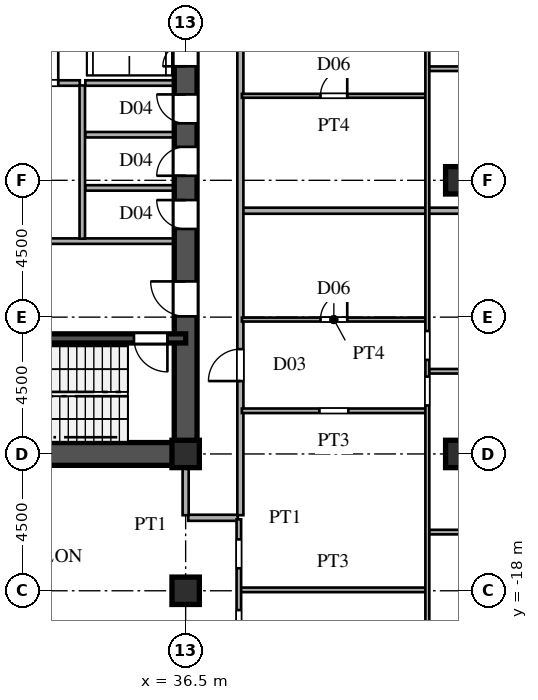
"""IFC4 building model, lengths in metres.
Left out: names, types, materials, properties, quantities, classifications, styles, units other than length and angle.
Written with IfcOpenShell. Run it as: python <this file> out.ifc"""

import sys

from ifc_helpers import new_model, si_unit, direction, frame, frame_2d, origin, origin_2d, place, context, subcontext, project, spatial, rectangle, i_section, extrude, source, transform, mapped, element, fill, save


model = new_model("IFC4")
c1 = context("Model", 3, precision=1e-05, world=origin(), true_north=direction((0.0, 1.0)))
c2 = subcontext(c1, "Body", "Model", "MODEL_VIEW")
j1 = project(units=[si_unit("LENGTHUNIT", "METRE"), si_unit("PLANEANGLEUNIT", "RADIAN")], contexts=[c1])
p1 = place(None, origin())
s1 = spatial("IfcSite", under=j1, at=p1, CompositionType="ELEMENT")
p2 = place(p1, origin())
s2 = spatial("IfcBuilding", under=s1, at=p2, CompositionType="ELEMENT")
p3 = place(p2, frame((0.0, 0.0, 54.9)))
s3 = spatial("IfcBuildingStorey", under=s2, at=p3, CompositionType="ELEMENT", Elevation=54.9)
m1 = source(origin(), c2, "Body", "SweptSolid", [
    extrude(i_section(OverallWidth=0.9, OverallDepth=0.9, WebThickness=0.036, FlangeThickness=0.055, at=origin_2d()), origin(), (0.0, 0.0, 1.0), 3.6),
])
for number, where, z_axis, x_axis in (
    (1, (36.5, -18.0, 0.0), (0.0, 0.0, 1.0), (1.0, 0.0, 0.0)),
    (2, (36.5, -13.5, 0.0), (0.0, 0.0, 1.0), (1.0, 0.0, 0.0)),
    (3, (45.5, -13.5, 0.0), (0.0, 0.0, 1.0), (1.0, 0.0, 0.0)),
    (4, (45.5, -4.5, 0.0), (0.0, 0.0, 1.0), (1.0, 0.0, 0.0)),
):
    element("IfcColumn", number, at=place(p3, frame(where, z_axis=z_axis, x_axis=x_axis)), inside=s3, PredefinedType="COLUMN", context=c2, shape_type="MappedRepresentation", body=[
        mapped(m1, transform((0.0, 0.0, 0.0), scale=1.0)),
    ])
p4 = place(p3, frame((27.5, -13.5, 0.0), z_axis=(0.0, 0.0, 1.0), x_axis=(1.0, 0.0, 0.0)))
e5 = element("IfcWall", 5, at=p4, inside=s3, PredefinedType="SHEAR", context=c2, shape_type="SweptSolid", body=[
    extrude(rectangle(XDim=9.0, YDim=0.75, at=frame_2d((4.5, 0.0))), origin(), (0.0, 0.0, 1.0), 3.38),
])
p5 = place(p3, frame((36.5, -13.65, 0.0), z_axis=(0.0, 0.0, 1.0), x_axis=(0.0, 1.0, 0.0)))
e6 = element("IfcWall", 6, at=p5, inside=s3, PredefinedType="SHEAR", context=c2, shape_type="SweptSolid", body=[
    extrude(rectangle(XDim=7.15, YDim=0.75, at=frame_2d((3.575, 0.0))), origin(), (0.0, 0.0, 1.0), 3.38),
])
p6 = place(p5, frame((4.675, 0.0, 0.0)))
e7 = element("IfcOpeningElement", 7, at=p6, cuts=e6, PredefinedType="OPENING", context=c2, shape_type="SweptSolid", body=[
    extrude(rectangle(XDim=1.15, YDim=2.2, at=frame_2d((0.575, 1.1))), frame((0.0, 0.385, 0.0), z_axis=(0.0, -1.0, 0.0), x_axis=(1.0, 0.0, 0.0)), (0.0, 0.0, 1.0), 0.77),
])
p7 = place(p3, frame((36.5, -1.3, 0.0), z_axis=(0.0, 0.0, 1.0), x_axis=(0.0, 1.0, 0.0)))
e8 = element("IfcWall", 8, at=p7, inside=s3, PredefinedType="SHEAR", context=c2, shape_type="SweptSolid", body=[
    extrude(rectangle(XDim=2.6, YDim=0.75, at=frame_2d((1.3, 0.0))), origin(), (0.0, 0.0, 1.0), 3.38),
])
p8 = place(p7, frame((0.55, 0.0, 0.0)))
e9 = element("IfcOpeningElement", 9, at=p8, cuts=e8, PredefinedType="OPENING", context=c2, shape_type="SweptSolid", body=[
    extrude(rectangle(XDim=1.5, YDim=2.3, at=frame_2d((0.75, 1.15))), frame((0.0, 0.385, 0.0), z_axis=(0.0, -1.0, 0.0), x_axis=(1.0, 0.0, 0.0)), (0.0, 0.0, 1.0), 0.77),
])
p9 = place(p3, frame((36.5, -6.5, 0.0), z_axis=(0.0, 0.0, 1.0), x_axis=(0.0, 1.0, 0.0)))
e10 = element("IfcWall", 10, at=p9, inside=s3, PredefinedType="SHEAR", context=c2, shape_type="SweptSolid", body=[
    extrude(rectangle(XDim=1.75, YDim=0.75, at=frame_2d((0.875, 0.0))), origin(), (0.0, 0.0, 1.0), 3.38),
])
p10 = place(p9, frame((0.4, 0.0, 0.0)))
e11 = element("IfcOpeningElement", 11, at=p10, cuts=e10, PredefinedType="OPENING", context=c2, shape_type="SweptSolid", body=[
    extrude(rectangle(XDim=0.95, YDim=2.15, at=frame_2d((0.475, 1.075))), frame((0.0, 0.385, 0.0), z_axis=(0.0, -1.0, 0.0), x_axis=(1.0, 0.0, 0.0)), (0.0, 0.0, 1.0), 0.77),
])
p11 = place(p3, frame((36.5, -4.75, 0.0), z_axis=(0.0, 0.0, 1.0), x_axis=(0.0, 1.0, 0.0)))
e12 = element("IfcWall", 12, at=p11, inside=s3, PredefinedType="SHEAR", context=c2, shape_type="SweptSolid", body=[
    extrude(rectangle(XDim=1.75, YDim=0.75, at=frame_2d((0.875, 0.0))), origin(), (0.0, 0.0, 1.0), 3.38),
])
p12 = place(p11, frame((0.4, 0.0, 0.0)))
e13 = element("IfcOpeningElement", 13, at=p12, cuts=e12, PredefinedType="OPENING", context=c2, shape_type="SweptSolid", body=[
    extrude(rectangle(XDim=0.95, YDim=2.15, at=frame_2d((0.475, 1.075))), frame((0.0, 0.385, 0.0), z_axis=(0.0, -1.0, 0.0), x_axis=(1.0, 0.0, 0.0)), (0.0, 0.0, 1.0), 0.77),
])
p13 = place(p3, frame((36.5, -3.0, 0.0), z_axis=(0.0, 0.0, 1.0), x_axis=(0.0, 1.0, 0.0)))
e14 = element("IfcWall", 14, at=p13, inside=s3, PredefinedType="SHEAR", context=c2, shape_type="SweptSolid", body=[
    extrude(rectangle(XDim=1.7, YDim=0.75, at=frame_2d((0.85, 0.0))), origin(), (0.0, 0.0, 1.0), 3.38),
])
p14 = place(p13, frame((0.375, 0.0, 0.0)))
e15 = element("IfcOpeningElement", 15, at=p14, cuts=e14, PredefinedType="OPENING", context=c2, shape_type="SweptSolid", body=[
    extrude(rectangle(XDim=0.95, YDim=2.15, at=frame_2d((0.475, 1.075))), frame((0.0, 0.385, 0.0), z_axis=(0.0, -1.0, 0.0), x_axis=(1.0, 0.0, 0.0)), (0.0, 0.0, 1.0), 0.77),
])
p15 = place(p3, frame((27.5, -9.7, 0.0), z_axis=(0.0, 0.0, 1.0), x_axis=(1.0, 0.0, 0.0)))
e16 = element("IfcWall", 16, at=p15, inside=s3, PredefinedType="SHEAR", context=c2, shape_type="SweptSolid", body=[
    extrude(rectangle(XDim=9.0, YDim=0.3, at=frame_2d((4.5, 0.0))), origin(), (0.0, 0.0, 1.0), 3.38),
])
p16 = place(p15, frame((7.3, 0.0, 0.0)))
e17 = element("IfcOpeningElement", 17, at=p16, cuts=e16, PredefinedType="OPENING", context=c2, shape_type="SweptSolid", body=[
    extrude(rectangle(XDim=1.1, YDim=2.2, at=frame_2d((0.55, 1.1))), frame((0.0, 0.16, 0.0), z_axis=(0.0, -1.0, 0.0), x_axis=(1.0, 0.0, 0.0)), (0.0, 0.0, 1.0), 0.32),
])
p17 = place(p3, frame((30.45, -6.5, 0.0), z_axis=(0.0, 0.0, 1.0), x_axis=(1.0, 0.0, 0.0)))
e18 = element("IfcWall", 18, at=p17, inside=s3, PredefinedType="PARTITIONING", context=c2, shape_type="SweptSolid", body=[
    extrude(rectangle(XDim=5.7, YDim=0.18, at=frame_2d((2.85, 0.0))), origin(), (0.0, 0.0, 1.0), 3.38),
])
p18 = place(p3, frame((33.1, -6.42, 0.0), z_axis=(0.0, 0.0, 1.0), x_axis=(0.0, 1.0, 0.0)))
e19 = element("IfcWall", 19, at=p18, inside=s3, PredefinedType="PARTITIONING", context=c2, shape_type="SweptSolid", body=[
    extrude(rectangle(XDim=5.04, YDim=0.18, at=frame_2d((2.52, 0.0))), origin(), (0.0, 0.0, 1.0), 3.38),
])
p19 = place(p3, frame((30.45, -1.3, 0.0), z_axis=(0.0, 0.0, 1.0), x_axis=(1.0, 0.0, 0.0)))
e20 = element("IfcWall", 20, at=p19, inside=s3, PredefinedType="PARTITIONING", context=c2, shape_type="SweptSolid", body=[
    extrude(rectangle(XDim=2.57, YDim=0.18, at=frame_2d((1.285, 0.0))), origin(), (0.0, 0.0, 1.0), 3.38),
])
p20 = place(p19, frame((0.71, 0.0, 0.0)))
e21 = element("IfcOpeningElement", 21, at=p20, cuts=e20, PredefinedType="OPENING", context=c2, shape_type="SweptSolid", body=[
    extrude(rectangle(XDim=1.15, YDim=2.2, at=frame_2d((0.575, 1.1))), frame((0.0, 0.1, 0.0), z_axis=(0.0, -1.0, 0.0), x_axis=(1.0, 0.0, 0.0)), (0.0, 0.0, 1.0), 0.2),
])
for number, where, z_axis, x_axis in (
    (22, (33.2, -1.3, 0.0), (0.0, 0.0, 1.0), (1.0, 0.0, 0.0)),
    (23, (33.2, -4.75, 0.0), (0.0, 0.0, 1.0), (1.0, 0.0, 0.0)),
    (24, (33.2, -3.0, 0.0), (0.0, 0.0, 1.0), (1.0, 0.0, 0.0)),
):
    element("IfcWall", number, at=place(p3, frame(where, z_axis=z_axis, x_axis=x_axis)), inside=s3, PredefinedType="PARTITIONING", context=c2, shape_type="SweptSolid", body=[
        extrude(rectangle(XDim=2.95, YDim=0.18, at=frame_2d((1.475, 0.0))), origin(), (0.0, 0.0, 1.0), 3.38),
    ])
p21 = place(p3, frame((38.3, -17.97, 0.0), z_axis=(0.0, 0.0, 1.0), x_axis=(1.0, 0.0, 0.0)))
e25 = element("IfcWall", 25, at=p21, inside=s3, PredefinedType="PARTITIONING", context=c2, shape_type="SweptSolid", body=[
    extrude(rectangle(XDim=6.1, YDim=0.15, at=frame_2d((3.05, 0.0))), origin(), (0.0, 0.0, 1.0), 3.38),
])
p22 = place(p3, frame((44.5, -16.07, 0.0), z_axis=(0.0, 0.0, 1.0), x_axis=(1.0, 0.0, 0.0)))
e26 = element("IfcWall", 26, at=p22, inside=s3, PredefinedType="PARTITIONING", context=c2, shape_type="SweptSolid", body=[
    extrude(rectangle(XDim=9.95, YDim=0.15, at=frame_2d((4.975, 0.0))), origin(), (0.0, 0.0, 1.0), 3.38),
])
p23 = place(p22, frame((4.5, 0.0, 0.0)))
e27 = element("IfcOpeningElement", 27, at=p23, cuts=e26, PredefinedType="OPENING", context=c2, shape_type="SweptSolid", body=[
    extrude(rectangle(XDim=0.95, YDim=2.15, at=frame_2d((0.475, 1.075))), frame((0.0, 0.085, 0.0), z_axis=(0.0, -1.0, 0.0), x_axis=(1.0, 0.0, 0.0)), (0.0, 0.0, 1.0), 0.17),
])
p24 = place(p3, frame((36.585, -15.6, 0.0), z_axis=(0.0, 0.0, 1.0), x_axis=(1.0, 0.0, 0.0)))
e28 = element("IfcWall", 28, at=p24, inside=s3, PredefinedType="PARTITIONING", context=c2, shape_type="SweptSolid", body=[
    extrude(rectangle(XDim=1.63, YDim=0.2, at=frame_2d((0.815, 0.0))), origin(), (0.0, 0.0, 1.0), 3.38),
])
p25 = place(p3, frame((38.35, -12.08, 0.0), z_axis=(0.0, 0.0, 1.0), x_axis=(1.0, 0.0, 0.0)))
e29 = element("IfcWall", 29, at=p25, inside=s3, PredefinedType="PARTITIONING", context=c2, shape_type="SweptSolid", body=[
    extrude(rectangle(XDim=6.05, YDim=0.15, at=frame_2d((3.025, 0.0))), origin(), (0.0, 0.0, 1.0), 3.38),
])
p26 = place(p25, frame((2.55, 0.0, 0.0)))
e30 = element("IfcOpeningElement", 30, at=p26, cuts=e29, PredefinedType="OPENING", context=c2, shape_type="SweptSolid", body=[
    extrude(rectangle(XDim=0.95, YDim=2.15, at=frame_2d((0.475, 1.075))), frame((0.0, 0.085, 0.0), z_axis=(0.0, -1.0, 0.0), x_axis=(1.0, 0.0, 0.0)), (0.0, 0.0, 1.0), 0.17),
])
p27 = place(p3, frame((44.5, -10.78, 0.0), z_axis=(0.0, 0.0, 1.0), x_axis=(1.0, 0.0, 0.0)))
e31 = element("IfcWall", 31, at=p27, inside=s3, PredefinedType="PARTITIONING", context=c2, shape_type="SweptSolid", body=[
    extrude(rectangle(XDim=26.097, YDim=0.15, at=frame_2d((13.048, 0.0))), origin(), (0.0, 0.0, 1.0), 3.38),
])
p28 = place(p27, frame((12.375, 0.0, 0.0)))
e32 = element("IfcOpeningElement", 32, at=p28, cuts=e31, PredefinedType="OPENING", context=c2, shape_type="SweptSolid", body=[
    extrude(rectangle(XDim=0.95, YDim=2.15, at=frame_2d((0.475, 1.075))), frame((0.0, 0.085, 0.0), z_axis=(0.0, -1.0, 0.0), x_axis=(1.0, 0.0, 0.0)), (0.0, 0.0, 1.0), 0.17),
])
p29 = place(p3, frame((38.35, -9.08, 0.0), z_axis=(0.0, 0.0, 1.0), x_axis=(1.0, 0.0, 0.0)))
e33 = element("IfcWall", 33, at=p29, inside=s3, PredefinedType="PARTITIONING", context=c2, shape_type="SweptSolid", body=[
    extrude(rectangle(XDim=6.05, YDim=0.13, at=frame_2d((3.025, 0.0))), origin(), (0.0, 0.0, 1.0), 3.38),
])
p30 = place(p29, frame((2.585, 0.0, 0.0)))
e34 = element("IfcOpeningElement", 34, at=p30, cuts=e33, PredefinedType="OPENING", context=c2, shape_type="SweptSolid", body=[
    extrude(rectangle(XDim=0.88, YDim=2.1, at=frame_2d((0.44, 1.05))), frame((0.0, 0.075, 0.0), z_axis=(0.0, -1.0, 0.0), x_axis=(1.0, 0.0, 0.0)), (0.0, 0.0, 1.0), 0.15),
])
p31 = place(p3, frame((38.38, -5.5, 0.0), z_axis=(0.0, 0.0, 1.0), x_axis=(1.0, 0.0, 0.0)))
e35 = element("IfcWall", 35, at=p31, inside=s3, PredefinedType="PARTITIONING", context=c2, shape_type="SweptSolid", body=[
    extrude(rectangle(XDim=34.125, YDim=0.2, at=frame_2d((17.062, 0.0))), origin(), (0.0, 0.0, 1.0), 3.38),
])
p32 = place(p3, frame((38.35, -1.72, 0.0), z_axis=(0.0, 0.0, 1.0), x_axis=(1.0, 0.0, 0.0)))
e36 = element("IfcWall", 36, at=p32, inside=s3, PredefinedType="PARTITIONING", context=c2, shape_type="SweptSolid", body=[
    extrude(rectangle(XDim=6.05, YDim=0.13, at=frame_2d((3.025, 0.0))), origin(), (0.0, 0.0, 1.0), 3.38),
])
p33 = place(p32, frame((2.585, 0.0, 0.0)))
e37 = element("IfcOpeningElement", 37, at=p33, cuts=e36, PredefinedType="OPENING", context=c2, shape_type="SweptSolid", body=[
    extrude(rectangle(XDim=0.88, YDim=2.1, at=frame_2d((0.44, 1.05))), frame((0.0, 0.075, 0.0), z_axis=(0.0, -1.0, 0.0), x_axis=(1.0, 0.0, 0.0)), (0.0, 0.0, 1.0), 0.15),
])
p34 = place(p3, frame((44.5, -0.83, 0.0), z_axis=(0.0, 0.0, 1.0), x_axis=(1.0, 0.0, 0.0)))
e38 = element("IfcWall", 38, at=p34, inside=s3, PredefinedType="PARTITIONING", context=c2, shape_type="SweptSolid", body=[
    extrude(rectangle(XDim=28.035, YDim=0.15, at=frame_2d((14.018, 0.0))), origin(), (0.0, 0.0, 1.0), 3.38),
])
p35 = place(p34, frame((4.5, 0.0, 0.0)))
e39 = element("IfcOpeningElement", 39, at=p35, cuts=e38, PredefinedType="OPENING", context=c2, shape_type="SweptSolid", body=[
    extrude(rectangle(XDim=0.95, YDim=2.15, at=frame_2d((0.475, 1.075))), frame((0.0, 0.085, 0.0), z_axis=(0.0, -1.0, 0.0), x_axis=(1.0, 0.0, 0.0)), (0.0, 0.0, 1.0), 0.17),
])
p36 = place(p34, frame((12.375, 0.0, 0.0)))
e40 = element("IfcOpeningElement", 40, at=p36, cuts=e38, PredefinedType="OPENING", context=c2, shape_type="SweptSolid", body=[
    extrude(rectangle(XDim=0.95, YDim=2.15, at=frame_2d((0.475, 1.075))), frame((0.0, 0.085, 0.0), z_axis=(0.0, -1.0, 0.0), x_axis=(1.0, 0.0, 0.0)), (0.0, 0.0, 1.0), 0.17),
])
p37 = place(p3, frame((36.5, -15.515, 0.0), z_axis=(0.0, 0.0, 1.0), x_axis=(0.0, 1.0, 0.0)))
e41 = element("IfcWall", 41, at=p37, inside=s3, PredefinedType="PARTITIONING", context=c2, shape_type="SweptSolid", body=[
    extrude(rectangle(XDim=1.635, YDim=0.2, at=frame_2d((0.817, 0.0))), origin(), (0.0, 0.0, 1.0), 2.68),
])
p38 = place(p3, frame((38.25, -23.898, 0.0), z_axis=(0.0, 0.0, 1.0), x_axis=(0.0, 1.0, 0.0)))
e42 = element("IfcWall", 42, at=p38, inside=s3, PredefinedType="PARTITIONING", context=c2, shape_type="SweptSolid", body=[
    extrude(rectangle(XDim=8.248, YDim=0.15, at=frame_2d((4.124, 0.0))), origin(), (0.0, 0.0, 1.0), 3.38),
])
p39 = place(p38, frame((6.638, 0.0, 0.0)))
e43 = element("IfcOpeningElement", 43, at=p39, cuts=e42, PredefinedType="OPENING", context=c2, shape_type="SweptSolid", body=[
    extrude(rectangle(XDim=0.95, YDim=2.15, at=frame_2d((0.475, 1.075))), frame((0.0, 0.085, 0.0), z_axis=(0.0, -1.0, 0.0), x_axis=(1.0, 0.0, 0.0)), (0.0, 0.0, 1.0), 0.17),
])
p40 = place(p38, frame((4.313, 0.0, 0.0)))
e44 = element("IfcOpeningElement", 44, at=p40, cuts=e42, PredefinedType="OPENING", context=c2, shape_type="SweptSolid", body=[
    extrude(rectangle(XDim=0.95, YDim=2.15, at=frame_2d((0.475, 1.075))), frame((0.0, 0.085, 0.0), z_axis=(0.0, -1.0, 0.0), x_axis=(1.0, 0.0, 0.0)), (0.0, 0.0, 1.0), 0.17),
])
p41 = place(p3, frame((38.3, -15.515, 0.0), z_axis=(0.0, 0.0, 1.0), x_axis=(0.0, 1.0, 0.0)))
e45 = element("IfcWall", 45, at=p41, inside=s3, PredefinedType="PARTITIONING", context=c2, shape_type="SweptSolid", body=[
    extrude(rectangle(XDim=31.03, YDim=0.2, at=frame_2d((15.515, 0.0))), origin(), (0.0, 0.0, 1.0), 3.38),
])
p42 = place(p41, frame((4.413, 0.0, 0.0)))
e46 = element("IfcOpeningElement", 46, at=p42, cuts=e45, PredefinedType="OPENING", context=c2, shape_type="SweptSolid", body=[
    extrude(rectangle(XDim=1.05, YDim=2.25, at=frame_2d((0.525, 1.125))), frame((0.0, 0.11, 0.0), z_axis=(0.0, -1.0, 0.0), x_axis=(1.0, 0.0, 0.0)), (0.0, 0.0, 1.0), 0.22),
])
p43 = place(p41, frame((16.28, 0.0, 0.0)))
e47 = element("IfcOpeningElement", 47, at=p43, cuts=e45, PredefinedType="OPENING", context=c2, shape_type="SweptSolid", body=[
    extrude(rectangle(XDim=1.05, YDim=2.25, at=frame_2d((0.525, 1.125))), frame((0.0, 0.11, 0.0), z_axis=(0.0, -1.0, 0.0), x_axis=(1.0, 0.0, 0.0)), (0.0, 0.0, 1.0), 0.22),
])
p44 = place(p41, frame((27.635, 0.0, 0.0)))
e48 = element("IfcOpeningElement", 48, at=p44, cuts=e45, PredefinedType="OPENING", context=c2, shape_type="SweptSolid", body=[
    extrude(rectangle(XDim=1.05, YDim=2.25, at=frame_2d((0.525, 1.125))), frame((0.0, 0.11, 0.0), z_axis=(0.0, -1.0, 0.0), x_axis=(1.0, 0.0, 0.0)), (0.0, 0.0, 1.0), 0.22),
])
p45 = place(p3, frame((44.45, -21.389, 0.0), z_axis=(0.0, 0.0, 1.0), x_axis=(0.0, 1.0, 0.0)))
e49 = element("IfcWall", 49, at=p45, inside=s3, PredefinedType="PARTITIONING", context=c2, shape_type="SweptSolid", body=[
    extrude(rectangle(XDim=25.172, YDim=0.13, at=frame_2d((12.586, 0.0))), origin(), (0.0, 0.0, 1.0), 3.38),
])
p46 = place(p45, frame((10.983, 0.0, 0.0)))
e50 = element("IfcOpeningElement", 50, at=p46, cuts=e49, PredefinedType="OPENING", context=c2, shape_type="SweptSolid", body=[
    extrude(rectangle(XDim=0.95, YDim=2.15, at=frame_2d((0.475, 1.075))), frame((0.0, 0.075, 0.0), z_axis=(0.0, -1.0, 0.0), x_axis=(1.0, 0.0, 0.0)), (0.0, 0.0, 1.0), 0.15),
])
p47 = place(p45, frame((9.483, 0.0, 0.0)))
e51 = element("IfcOpeningElement", 51, at=p47, cuts=e49, PredefinedType="OPENING", context=c2, shape_type="SweptSolid", body=[
    extrude(rectangle(XDim=0.95, YDim=2.15, at=frame_2d((0.475, 1.075))), frame((0.0, 0.075, 0.0), z_axis=(0.0, -1.0, 0.0), x_axis=(1.0, 0.0, 0.0)), (0.0, 0.0, 1.0), 0.15),
])
p48 = place(p45, frame((22.414, 0.0, 0.0)))
e52 = element("IfcOpeningElement", 52, at=p48, cuts=e49, PredefinedType="OPENING", context=c2, shape_type="SweptSolid", body=[
    extrude(rectangle(XDim=0.95, YDim=2.15, at=frame_2d((0.475, 1.075))), frame((0.0, 0.075, 0.0), z_axis=(0.0, -1.0, 0.0), x_axis=(1.0, 0.0, 0.0)), (0.0, 0.0, 1.0), 0.15),
])
m2 = source(origin(), c2, "Body", "SweptSolid", [
    extrude(rectangle(XDim=1.15, YDim=2.2, at=frame_2d((0.575, 1.1))), frame((0.0, 0.025, 0.0), z_axis=(0.0, -1.0, 0.0), x_axis=(1.0, 0.0, 0.0)), (0.0, 0.0, 1.0), 0.05),
])
p49 = place(p6, origin())
e53 = element("IfcDoor", 53, at=p49, inside=s3, OperationType="SINGLE_SWING_RIGHT", PredefinedType="DOOR", context=c2, shape_type="MappedRepresentation", body=[
    mapped(m2, transform((0.0, 0.0, 0.0), scale=1.0)),
])
fill(e7, e53)
m3 = source(origin(), c2, "Body", "SweptSolid", [
    extrude(rectangle(XDim=1.5, YDim=2.3, at=frame_2d((0.75, 1.15))), frame((0.0, 0.025, 0.0), z_axis=(0.0, -1.0, 0.0), x_axis=(1.0, 0.0, 0.0)), (0.0, 0.0, 1.0), 0.05),
])
p50 = place(p8, origin())
e54 = element("IfcDoor", 54, at=p50, inside=s3, OperationType="DOUBLE_SWING_LEFT", PredefinedType="DOOR", context=c2, shape_type="MappedRepresentation", body=[
    mapped(m3, transform((0.0, 0.0, 0.0), scale=1.0)),
])
fill(e9, e54)
m4 = source(origin(), c2, "Body", "SweptSolid", [
    extrude(rectangle(XDim=0.95, YDim=2.15, at=frame_2d((0.475, 1.075))), frame((0.0, 0.025, 0.0), z_axis=(0.0, -1.0, 0.0), x_axis=(1.0, 0.0, 0.0)), (0.0, 0.0, 1.0), 0.05),
])
p51 = place(p10, origin())
e55 = element("IfcDoor", 55, at=p51, inside=s3, OperationType="SINGLE_SWING_RIGHT", PredefinedType="DOOR", context=c2, shape_type="MappedRepresentation", body=[
    mapped(m4, transform((0.0, 0.0, 0.0), scale=1.0)),
])
fill(e11, e55)
p52 = place(p12, origin())
e56 = element("IfcDoor", 56, at=p52, inside=s3, OperationType="SINGLE_SWING_LEFT", PredefinedType="DOOR", context=c2, shape_type="MappedRepresentation", body=[
    mapped(m4, transform((0.0, 0.0, 0.0), scale=1.0)),
])
fill(e13, e56)
p53 = place(p14, origin())
e57 = element("IfcDoor", 57, at=p53, inside=s3, OperationType="SINGLE_SWING_RIGHT", PredefinedType="DOOR", context=c2, shape_type="MappedRepresentation", body=[
    mapped(m4, transform((0.0, 0.0, 0.0), scale=1.0)),
])
fill(e15, e57)
m5 = source(origin(), c2, "Body", "SweptSolid", [
    extrude(rectangle(XDim=1.1, YDim=2.2, at=frame_2d((0.55, 1.1))), frame((0.0, 0.025, 0.0), z_axis=(0.0, -1.0, 0.0), x_axis=(1.0, 0.0, 0.0)), (0.0, 0.0, 1.0), 0.05),
])
p54 = place(p16, frame((1.1, 0.0, 0.0), z_axis=(0.0, 0.0, 1.0), x_axis=(-1.0, 0.0, 0.0)))
e58 = element("IfcDoor", 58, at=p54, inside=s3, OperationType="SINGLE_SWING_RIGHT", PredefinedType="DOOR", context=c2, shape_type="MappedRepresentation", body=[
    mapped(m5, transform((0.0, 0.0, 0.0), scale=1.0)),
])
fill(e17, e58)
p55 = place(p20, origin())
e59 = element("IfcDoor", 59, at=p55, inside=s3, OperationType="SINGLE_SWING_RIGHT", PredefinedType="DOOR", context=c2, shape_type="MappedRepresentation", body=[
    mapped(m2, transform((0.0, 0.0, 0.0), scale=1.0)),
])
fill(e21, e59)
m6 = source(origin(), c2, "Body", "SweptSolid", [
    extrude(rectangle(XDim=0.88, YDim=2.1, at=frame_2d((0.44, 1.05))), frame((0.0, 0.025, 0.0), z_axis=(0.0, -1.0, 0.0), x_axis=(1.0, 0.0, 0.0)), (0.0, 0.0, 1.0), 0.05),
])
p56 = place(p30, origin())
e60 = element("IfcDoor", 60, at=p56, inside=s3, OperationType="SINGLE_SWING_RIGHT", PredefinedType="DOOR", context=c2, shape_type="MappedRepresentation", body=[
    mapped(m6, transform((0.0, 0.0, 0.0), scale=1.0)),
])
fill(e34, e60)
p57 = place(p33, origin())
e61 = element("IfcDoor", 61, at=p57, inside=s3, OperationType="SINGLE_SWING_RIGHT", PredefinedType="DOOR", context=c2, shape_type="MappedRepresentation", body=[
    mapped(m6, transform((0.0, 0.0, 0.0), scale=1.0)),
])
fill(e37, e61)
m7 = source(origin(), c2, "Body", "SweptSolid", [
    extrude(rectangle(XDim=1.05, YDim=2.25, at=frame_2d((0.525, 1.125))), frame((0.0, 0.025, 0.0), z_axis=(0.0, -1.0, 0.0), x_axis=(1.0, 0.0, 0.0)), (0.0, 0.0, 1.0), 0.05),
])
p58 = place(p42, origin())
e62 = element("IfcDoor", 62, at=p58, inside=s3, OperationType="SINGLE_SWING_LEFT", PredefinedType="DOOR", context=c2, shape_type="MappedRepresentation", body=[
    mapped(m7, transform((0.0, 0.0, 0.0), scale=1.0)),
])
fill(e46, e62)
save(model, sys.argv[1])
